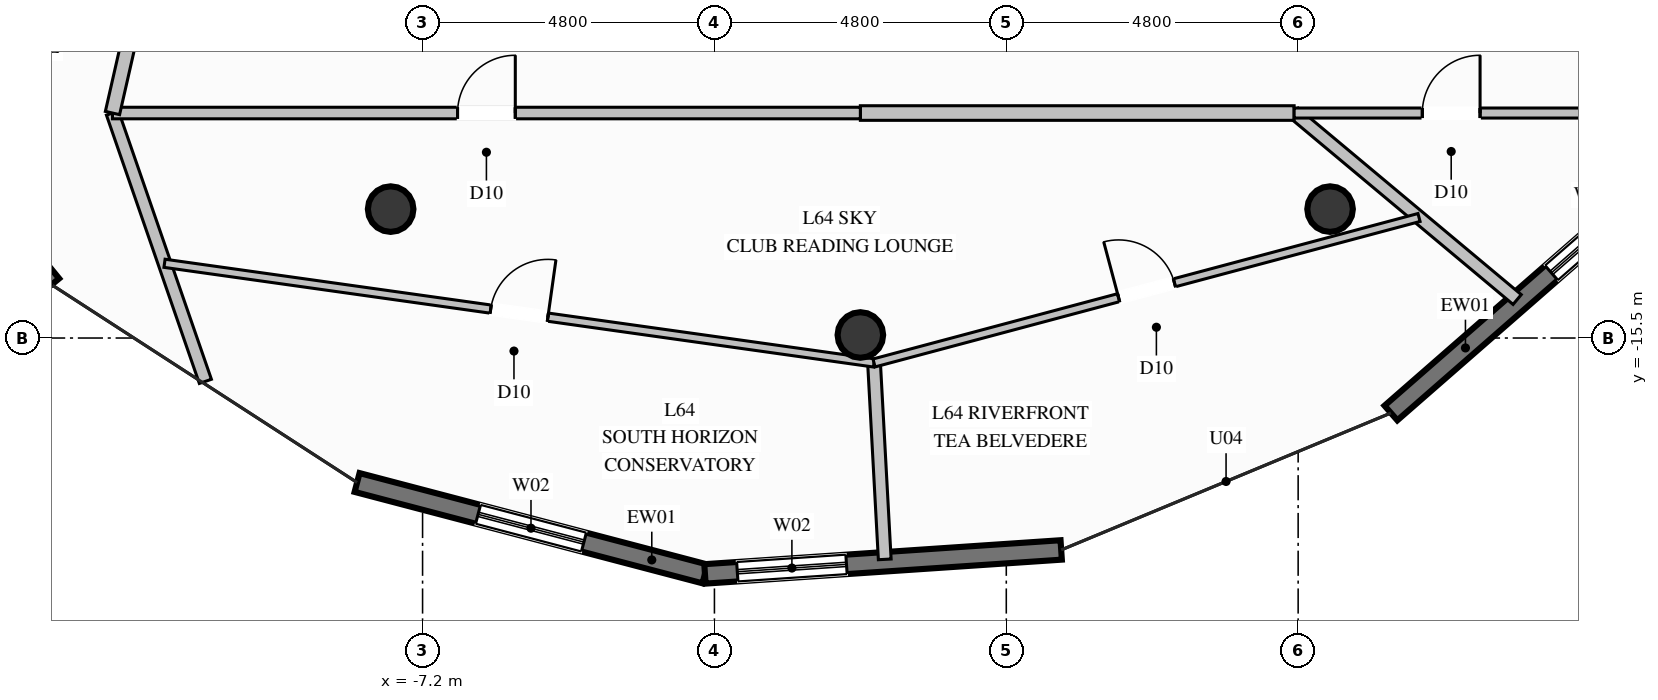
"""IFC4 building model, lengths in metres.
Left out: names, types, materials, properties, quantities, classifications, styles, units other than length and angle.
Written with IfcOpenShell. Run it as: python <this file> out.ifc"""

import sys

from ifc_helpers import new_model, si_unit, direction, frame, frame_2d, origin, origin_2d, place, context, subcontext, project, spatial, rectangle, circle, extrude, element, fill, save


model = new_model("IFC4")
c1 = context("Model", 3, precision=1e-05, world=origin(), true_north=direction((0.0, 1.0)))
c2 = subcontext(c1, "Body", "Model", "MODEL_VIEW")
j1 = project(units=[si_unit("LENGTHUNIT", "METRE"), si_unit("PLANEANGLEUNIT", "RADIAN")], contexts=[c1])
p1 = place(None, origin())
s1 = spatial("IfcSite", under=j1, at=p1, CompositionType="ELEMENT")
p2 = place(p1, origin())
s2 = spatial("IfcBuilding", under=s1, at=p2, CompositionType="ELEMENT")
p3 = place(p2, frame((0.0, 0.0, 246.8)))
s3 = spatial("IfcBuildingStorey", under=s2, at=p3, CompositionType="ELEMENT", Elevation=246.8)
for number, where, z_axis, x_axis in (
    (1, (-7.725, -13.38, 0.0), (0.0, 0.0, 1.0), (1.0, 0.0, 0.0)),
    (2, (0.0, -15.45, 0.0), (0.0, 0.0, 1.0), (1.0, 0.0, 0.0)),
    (3, (7.725, -13.38, 0.0), (0.0, 0.0, 1.0), (1.0, 0.0, 0.0)),
):
    element("IfcColumn", number, at=place(p3, frame(where, z_axis=z_axis, x_axis=x_axis)), inside=s3, PredefinedType="COLUMN", context=c2, shape_type="SweptSolid", body=[
        extrude(circle(Radius=0.375, at=origin_2d()), origin(), (0.0, 0.0, 1.0), 3.8),
    ])
p4 = place(p3, frame((13.182, -12.842, 0.0), z_axis=(0.0, 0.0, 1.0), x_axis=(-0.753243589512, -0.657741662706, 0.0)))
e4 = element("IfcWall", 4, at=p4, inside=s3, PredefinedType="SOLIDWALL", context=c2, shape_type="SweptSolid", body=[
    extrude(rectangle(XDim=5.916, YDim=0.32, at=frame_2d((2.958, 0.0))), origin(), (0.0, 0.0, 1.0), 3.57),
])
p5 = place(p4, frame((0.612, 0.0, 0.35)))
e5 = element("IfcOpeningElement", 5, at=p5, cuts=e4, PredefinedType="OPENING", context=c2, shape_type="SweptSolid", body=[
    extrude(rectangle(XDim=1.8, YDim=2.6, at=frame_2d((0.9, 1.3))), frame((0.0, 0.17, 0.0), z_axis=(0.0, -1.0, 0.0), x_axis=(1.0, 0.0, 0.0)), (0.0, 0.0, 1.0), 0.34),
])
p6 = place(p3, frame((-13.301, -14.623, 0.0), z_axis=(0.0, 0.0, 1.0), x_axis=(-0.633391522875, 0.773831492478, 0.0)))
e6 = element("IfcWall", 6, at=p6, inside=s3, PredefinedType="SOLIDWALL", context=c2, shape_type="SweptSolid", body=[
    extrude(rectangle(XDim=6.053, YDim=0.32, at=frame_2d((3.027, 0.0))), origin(), (0.0, 0.0, 1.0), 3.57),
])
p7 = place(p6, frame((2.242, 0.0, 0.85)))
e7 = element("IfcOpeningElement", 7, at=p7, cuts=e6, PredefinedType="OPENING", context=c2, shape_type="SweptSolid", body=[
    extrude(rectangle(XDim=1.5, YDim=1.2, at=frame_2d((0.75, 0.6))), frame((0.0, 0.17, 0.0), z_axis=(0.0, -1.0, 0.0), x_axis=(1.0, 0.0, 0.0)), (0.0, 0.0, 1.0), 0.34),
])
p8 = place(p3, frame((-2.556, -19.379, 0.0), z_axis=(0.0, 0.0, 1.0), x_axis=(-0.96718457854, 0.254074774494, 0.0)))
e8 = element("IfcWall", 8, at=p8, inside=s3, PredefinedType="SOLIDWALL", context=c2, shape_type="SweptSolid", body=[
    extrude(rectangle(XDim=5.915, YDim=0.32, at=frame_2d((2.958, 0.0))), origin(), (0.0, 0.0, 1.0), 3.57),
])
p9 = place(p8, frame((2.058, 0.0, 0.35)))
e9 = element("IfcOpeningElement", 9, at=p9, cuts=e8, PredefinedType="OPENING", context=c2, shape_type="SweptSolid", body=[
    extrude(rectangle(XDim=1.8, YDim=2.6, at=frame_2d((0.9, 1.3))), frame((0.0, 0.17, 0.0), z_axis=(0.0, -1.0, 0.0), x_axis=(1.0, 0.0, 0.0)), (0.0, 0.0, 1.0), 0.34),
])
p10 = place(p3, frame((3.303, -18.985, 0.0), z_axis=(0.0, 0.0, 1.0), x_axis=(-0.997748768453, -0.067062620365, 0.0)))
e10 = element("IfcWall", 10, at=p10, inside=s3, PredefinedType="SOLIDWALL", context=c2, shape_type="SweptSolid", body=[
    extrude(rectangle(XDim=5.872, YDim=0.32, at=frame_2d((2.936, 0.0))), origin(), (0.0, 0.0, 1.0), 3.57),
])
p11 = place(p10, frame((3.539, 0.0, 0.35)))
e11 = element("IfcOpeningElement", 11, at=p11, cuts=e10, PredefinedType="OPENING", context=c2, shape_type="SweptSolid", body=[
    extrude(rectangle(XDim=1.8, YDim=2.6, at=frame_2d((0.9, 1.3))), frame((0.0, 0.17, 0.0), z_axis=(0.0, -1.0, 0.0), x_axis=(1.0, 0.0, 0.0)), (0.0, 0.0, 1.0), 0.34),
])
p12 = place(p3, frame((7.134, -11.8, 0.0), z_axis=(0.0, 0.0, 1.0), x_axis=(0.767165499913, -0.641449215249, 0.0)))
e12 = element("IfcWall", 12, at=p12, inside=s3, PredefinedType="PARTITIONING", context=c2, shape_type="SweptSolid", body=[
    extrude(rectangle(XDim=4.781, YDim=0.21, at=frame_2d((2.391, 0.0))), origin(), (0.0, 0.0, 1.0), 3.57),
])
p13 = place(p3, frame((-12.3, -11.8, 0.0), z_axis=(0.0, 0.0, 1.0), x_axis=(0.327216501768, -0.944949395984, 0.0)))
e13 = element("IfcWall", 13, at=p13, inside=s3, PredefinedType="PARTITIONING", context=c2, shape_type="SweptSolid", body=[
    extrude(rectangle(XDim=4.67, YDim=0.21, at=frame_2d((2.335, 0.0))), origin(), (0.0, 0.0, 1.0), 3.57),
])
p14 = place(p3, frame((0.0, -11.8, 0.0), z_axis=(0.0, 0.0, 1.0), x_axis=(1.0, 0.0, 0.0)))
e14 = element("IfcWall", 14, at=p14, inside=s3, PredefinedType="PARTITIONING", context=c2, shape_type="SweptSolid", body=[
    extrude(rectangle(XDim=7.134, YDim=0.24, at=frame_2d((3.567, 0.0))), origin(), (0.0, 0.0, 1.0), 3.57),
])
p15 = place(p3, frame((-12.3, -11.8, 0.0), z_axis=(0.0, 0.0, 1.0), x_axis=(1.0, 0.0, 0.0)))
e15 = element("IfcWall", 15, at=p15, inside=s3, PredefinedType="PARTITIONING", context=c2, shape_type="SweptSolid", body=[
    extrude(rectangle(XDim=12.3, YDim=0.19, at=frame_2d((6.15, 0.0))), origin(), (0.0, 0.0, 1.0), 3.57),
])
p16 = place(p15, frame((5.675, 0.0, 0.0)))
e16 = element("IfcOpeningElement", 16, at=p16, cuts=e15, PredefinedType="OPENING", context=c2, shape_type="SweptSolid", body=[
    extrude(rectangle(XDim=0.95, YDim=2.1, at=frame_2d((0.475, 1.05))), frame((0.0, 0.105, 0.0), z_axis=(0.0, -1.0, 0.0), x_axis=(1.0, 0.0, 0.0)), (0.0, 0.0, 1.0), 0.21),
])
p17 = place(p3, frame((-11.042, -6.275, 0.0), z_axis=(0.0, 0.0, 1.0), x_axis=(-0.222014008723, -0.975043475918, 0.0)))
e17 = element("IfcWall", 17, at=p17, inside=s3, PredefinedType="PARTITIONING", context=c2, shape_type="SweptSolid", body=[
    extrude(rectangle(XDim=5.667, YDim=0.24, at=frame_2d((2.833, 0.0))), origin(), (0.0, 0.0, 1.0), 3.57),
])
p18 = place(p17, frame((2.333, 0.0, 0.0)))
e18 = element("IfcOpeningElement", 18, at=p18, cuts=e17, PredefinedType="OPENING", context=c2, shape_type="SweptSolid", body=[
    extrude(rectangle(XDim=1.0, YDim=2.2, at=frame_2d((0.5, 1.1))), frame((0.0, 0.13, 0.0), z_axis=(0.0, -1.0, 0.0), x_axis=(1.0, 0.0, 0.0)), (0.0, 0.0, 1.0), 0.26),
])
p19 = place(p3, frame((0.225, -15.91, 0.0), z_axis=(0.0, 0.0, 1.0), x_axis=(0.054341356021, -0.998522416887, 0.0)))
e19 = element("IfcWall", 19, at=p19, inside=s3, PredefinedType="PARTITIONING", context=c2, shape_type="SweptSolid", body=[
    extrude(rectangle(XDim=3.235, YDim=0.21, at=frame_2d((1.617, 0.0))), origin(), (0.0, 0.0, 1.0), 3.57),
])
p20 = place(p3, frame((-11.444, -14.271, 0.0), z_axis=(0.0, 0.0, 1.0), x_axis=(0.990280714827, -0.139083089705, 0.0)))
e20 = element("IfcWall", 20, at=p20, inside=s3, PredefinedType="PARTITIONING", context=c2, shape_type="SweptSolid", body=[
    extrude(rectangle(XDim=11.784, YDim=0.135, at=frame_2d((5.892, 0.0))), origin(), (0.0, 0.0, 1.0), 3.139),
])
p21 = place(p20, frame((5.417, 0.0, 0.0)))
e21 = element("IfcOpeningElement", 21, at=p21, cuts=e20, PredefinedType="OPENING", context=c2, shape_type="SweptSolid", body=[
    extrude(rectangle(XDim=0.95, YDim=2.1, at=frame_2d((0.475, 1.05))), frame((0.0, 0.078, 0.0), z_axis=(0.0, -1.0, 0.0), x_axis=(1.0, 0.0, 0.0)), (0.0, 0.0, 1.0), 0.155),
])
p22 = place(p3, frame((0.225, -15.91, 0.0), z_axis=(0.0, 0.0, 1.0), x_axis=(0.966188184598, 0.25783791797, 0.0)))
e22 = element("IfcWall", 22, at=p22, inside=s3, PredefinedType="PARTITIONING", context=c2, shape_type="SweptSolid", body=[
    extrude(rectangle(XDim=9.277, YDim=0.135, at=frame_2d((4.638, 0.0))), origin(), (0.0, 0.0, 1.0), 3.139),
])
p23 = place(p22, frame((4.163, 0.0, 0.0)))
e23 = element("IfcOpeningElement", 23, at=p23, cuts=e22, PredefinedType="OPENING", context=c2, shape_type="SweptSolid", body=[
    extrude(rectangle(XDim=0.95, YDim=2.1, at=frame_2d((0.475, 1.05))), frame((0.0, 0.078, 0.0), z_axis=(0.0, -1.0, 0.0), x_axis=(1.0, 0.0, 0.0)), (0.0, 0.0, 1.0), 0.155),
])
p24 = place(p3, frame((12.3, -11.8, 0.0), z_axis=(0.0, 0.0, 1.0), x_axis=(-0.222014008723, 0.975043475918, 0.0)))
e24 = element("IfcWall", 24, at=p24, inside=s3, PredefinedType="PARTITIONING", context=c2, shape_type="SweptSolid", body=[
    extrude(rectangle(XDim=5.667, YDim=0.24, at=frame_2d((2.833, 0.0))), origin(), (0.0, 0.0, 1.0), 3.57),
])
p25 = place(p3, frame((7.134, -11.8, 0.0), z_axis=(0.0, 0.0, 1.0), x_axis=(1.0, 0.0, 0.0)))
e25 = element("IfcWall", 25, at=p25, inside=s3, PredefinedType="PARTITIONING", context=c2, shape_type="SweptSolid", body=[
    extrude(rectangle(XDim=5.166, YDim=0.165, at=frame_2d((2.583, 0.0))), origin(), (0.0, 0.0, 1.0), 3.57),
])
p26 = place(p25, frame((2.108, 0.0, 0.0)))
e26 = element("IfcOpeningElement", 26, at=p26, cuts=e25, PredefinedType="OPENING", context=c2, shape_type="SweptSolid", body=[
    extrude(rectangle(XDim=0.95, YDim=2.1, at=frame_2d((0.475, 1.05))), frame((0.0, 0.093, 0.0), z_axis=(0.0, -1.0, 0.0), x_axis=(1.0, 0.0, 0.0)), (0.0, 0.0, 1.0), 0.185),
])
p27 = place(p5, origin())
e27 = element("IfcWindow", 27, at=p27, inside=s3, PartitioningType="SINGLE_PANEL", PredefinedType="WINDOW", context=c2, shape_type="SweptSolid", body=[
    extrude(rectangle(XDim=1.8, YDim=2.6, at=frame_2d((0.9, 1.3))), frame((0.0, 0.03, 0.0), z_axis=(0.0, -1.0, 0.0), x_axis=(1.0, 0.0, 0.0)), (0.0, 0.0, 1.0), 0.06),
])
fill(e5, e27)
p28 = place(p9, origin())
e28 = element("IfcWindow", 28, at=p28, inside=s3, PartitioningType="SINGLE_PANEL", PredefinedType="WINDOW", context=c2, shape_type="SweptSolid", body=[
    extrude(rectangle(XDim=1.8, YDim=2.6, at=frame_2d((0.9, 1.3))), frame((0.0, 0.03, 0.0), z_axis=(0.0, -1.0, 0.0), x_axis=(1.0, 0.0, 0.0)), (0.0, 0.0, 1.0), 0.06),
])
fill(e9, e28)
p29 = place(p11, origin())
e29 = element("IfcWindow", 29, at=p29, inside=s3, PartitioningType="SINGLE_PANEL", PredefinedType="WINDOW", context=c2, shape_type="SweptSolid", body=[
    extrude(rectangle(XDim=1.8, YDim=2.6, at=frame_2d((0.9, 1.3))), frame((0.0, 0.03, 0.0), z_axis=(0.0, -1.0, 0.0), x_axis=(1.0, 0.0, 0.0)), (0.0, 0.0, 1.0), 0.06),
])
fill(e11, e29)
p30 = place(p16, origin())
e30 = element("IfcDoor", 30, at=p30, inside=s3, OperationType="SINGLE_SWING_RIGHT", PredefinedType="DOOR", context=c2, shape_type="SweptSolid", body=[
    extrude(rectangle(XDim=0.95, YDim=2.1, at=frame_2d((0.475, 1.05))), frame((0.0, 0.025, 0.0), z_axis=(0.0, -1.0, 0.0), x_axis=(1.0, 0.0, 0.0)), (0.0, 0.0, 1.0), 0.05),
])
fill(e16, e30)
p31 = place(p21, origin())
e31 = element("IfcDoor", 31, at=p31, inside=s3, OperationType="SINGLE_SWING_RIGHT", PredefinedType="DOOR", context=c2, shape_type="SweptSolid", body=[
    extrude(rectangle(XDim=0.95, YDim=2.1, at=frame_2d((0.475, 1.05))), frame((0.0, 0.025, 0.0), z_axis=(0.0, -1.0, 0.0), x_axis=(1.0, 0.0, 0.0)), (0.0, 0.0, 1.0), 0.05),
])
fill(e21, e31)
p32 = place(p23, origin())
e32 = element("IfcDoor", 32, at=p32, inside=s3, OperationType="SINGLE_SWING_LEFT", PredefinedType="DOOR", context=c2, shape_type="SweptSolid", body=[
    extrude(rectangle(XDim=0.95, YDim=2.1, at=frame_2d((0.475, 1.05))), frame((0.0, 0.025, 0.0), z_axis=(0.0, -1.0, 0.0), x_axis=(1.0, 0.0, 0.0)), (0.0, 0.0, 1.0), 0.05),
])
fill(e23, e32)
p33 = place(p26, origin())
e33 = element("IfcDoor", 33, at=p33, inside=s3, OperationType="SINGLE_SWING_RIGHT", PredefinedType="DOOR", context=c2, shape_type="SweptSolid", body=[
    extrude(rectangle(XDim=0.95, YDim=2.1, at=frame_2d((0.475, 1.05))), frame((0.0, 0.025, 0.0), z_axis=(0.0, -1.0, 0.0), x_axis=(1.0, 0.0, 0.0)), (0.0, 0.0, 1.0), 0.05),
])
fill(e26, e33)
save(model, sys.argv[1])
